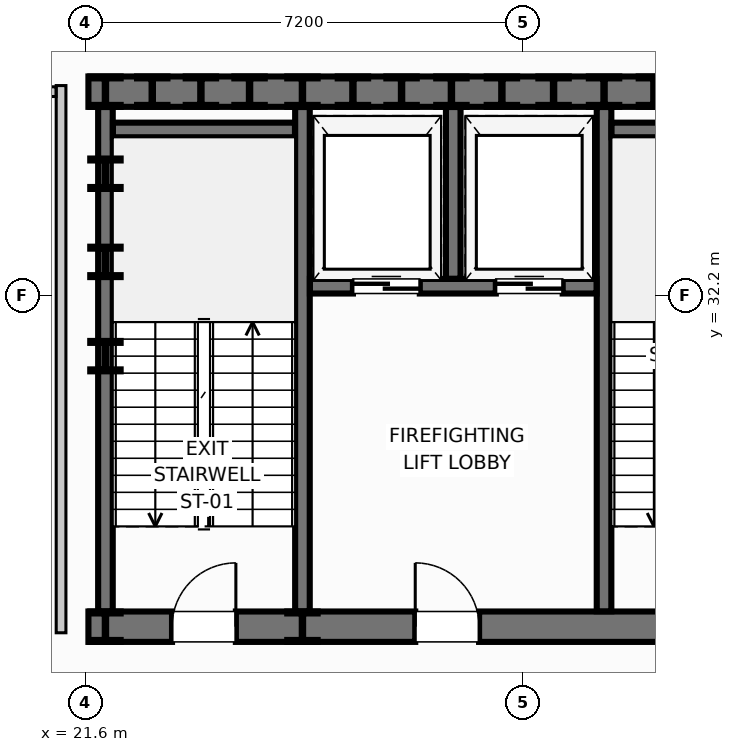
"""IFC4 building model, lengths in metres.
Left out: names, types, materials, properties, quantities, classifications, styles, units other than length and angle.
Written with IfcOpenShell. Run it as: python <this file> out.ifc"""

import sys

from ifc_helpers import new_model, si_unit, direction, frame, frame_2d, origin, origin_2d, place, context, subcontext, project, spatial, rectangle, i_section, extrude, element, fill, save


model = new_model("IFC4")
c1 = context("Model", 3, precision=1e-05, world=origin(), true_north=direction((0.0, 1.0)))
c2 = subcontext(c1, "Body", "Model", "MODEL_VIEW")
j1 = project(units=[si_unit("LENGTHUNIT", "METRE"), si_unit("PLANEANGLEUNIT", "RADIAN")], contexts=[c1])
p1 = place(None, origin())
s1 = spatial("IfcSite", under=j1, at=p1, CompositionType="ELEMENT")
p2 = place(p1, origin())
s2 = spatial("IfcBuilding", under=s1, at=p2, CompositionType="ELEMENT")
p3 = place(p2, frame((0.0, 0.0, 105.95)))
s3 = spatial("IfcBuildingStorey", under=s2, at=p3, CompositionType="ELEMENT", Elevation=105.95)
for number, where, z_axis, x_axis in (
    (1, (21.93, 35.55, 0.0), (0.0, 0.0, 1.0), (1.0, 0.0, 0.0)),
    (2, (23.5, 35.55, 0.0), (0.0, 0.0, 1.0), (1.0, 0.0, 0.0)),
    (3, (25.17, 35.55, 0.0), (0.0, 0.0, 1.0), (1.0, 0.0, 0.0)),
    (4, (26.8, 35.55, 0.0), (0.0, 0.0, 1.0), (1.0, 0.0, 0.0)),
    (5, (28.45, 35.55, 0.0), (0.0, 0.0, 1.0), (1.0, 0.0, 0.0)),
    (6, (30.13, 35.55, 0.0), (0.0, 0.0, 1.0), (1.0, 0.0, 0.0)),
    (7, (21.93, 26.75, 0.0), (0.0, 0.0, 1.0), (1.0, 0.0, 0.0)),
    (8, (25.17, 26.75, 0.0), (0.0, 0.0, 1.0), (1.0, 0.0, 0.0)),
    (9, (21.93, 31.2, 0.0), (0.0, 0.0, 1.0), (1.0, 0.0, 0.0)),
    (10, (21.93, 32.75, 0.0), (0.0, 0.0, 1.0), (1.0, 0.0, 0.0)),
    (11, (21.93, 34.2, 0.0), (0.0, 0.0, 1.0), (1.0, 0.0, 0.0)),
    (12, (22.7, 35.55, 0.0), (0.0, 0.0, 1.0), (1.0, 0.0, 0.0)),
    (13, (27.62, 35.55, 0.0), (0.0, 0.0, 1.0), (1.0, 0.0, 0.0)),
    (14, (24.3, 35.55, 0.0), (0.0, 0.0, 1.0), (1.0, 0.0, 0.0)),
    (15, (26.0, 35.55, 0.0), (0.0, 0.0, 1.0), (1.0, 0.0, 0.0)),
    (16, (29.3, 35.55, 0.0), (0.0, 0.0, 1.0), (1.0, 0.0, 0.0)),
    (17, (30.95, 35.55, 0.0), (0.0, 0.0, 1.0), (1.0, 0.0, 0.0)),
):
    element("IfcColumn", number, at=place(p3, frame(where, z_axis=z_axis, x_axis=x_axis)), inside=s3, PredefinedType="COLUMN", context=c2, shape_type="SweptSolid", body=[
        extrude(i_section(OverallWidth=0.5, OverallDepth=0.5, WebThickness=0.022, FlangeThickness=0.032, at=origin_2d()), origin(), (0.0, 0.0, 1.0), 4.5),
    ])
p4 = place(p3, frame((21.65, 26.75, 0.0), z_axis=(0.0, 0.0, 1.0), x_axis=(1.0, 0.0, 0.0)))
e18 = element("IfcWall", 18, at=p4, inside=s3, PredefinedType="SHEAR", context=c2, shape_type="SweptSolid", body=[
    extrude(rectangle(XDim=28.7, YDim=0.5, at=frame_2d((14.35, 0.0))), origin(), (0.0, 0.0, 1.0), 4.5),
])
p5 = place(p4, frame((1.375, 0.0, 0.0)))
e19 = element("IfcOpeningElement", 19, at=p5, cuts=e18, PredefinedType="OPENING", context=c2, shape_type="SweptSolid", body=[
    extrude(rectangle(XDim=1.05, YDim=2.0, at=frame_2d((0.525, 1.0))), frame((0.0, 0.26, 0.0), z_axis=(0.0, -1.0, 0.0), x_axis=(1.0, 0.0, 0.0)), (0.0, 0.0, 1.0), 0.52),
])
p6 = place(p4, frame((5.375, 0.0, 0.0)))
e20 = element("IfcOpeningElement", 20, at=p6, cuts=e18, PredefinedType="OPENING", context=c2, shape_type="SweptSolid", body=[
    extrude(rectangle(XDim=1.05, YDim=2.0, at=frame_2d((0.525, 1.0))), frame((0.0, 0.26, 0.0), z_axis=(0.0, -1.0, 0.0), x_axis=(1.0, 0.0, 0.0)), (0.0, 0.0, 1.0), 0.52),
])
p7 = place(p4, frame((9.575, 0.0, 0.0)))
e21 = element("IfcOpeningElement", 21, at=p7, cuts=e18, PredefinedType="OPENING", context=c2, shape_type="SweptSolid", body=[
    extrude(rectangle(XDim=1.05, YDim=2.0, at=frame_2d((0.525, 1.0))), frame((0.0, 0.26, 0.0), z_axis=(0.0, -1.0, 0.0), x_axis=(1.0, 0.0, 0.0)), (0.0, 0.0, 1.0), 0.52),
])
p8 = place(p4, frame((19.705, 0.0, 0.0)))
e22 = element("IfcOpeningElement", 22, at=p8, cuts=e18, PredefinedType="OPENING", context=c2, shape_type="SweptSolid", body=[
    extrude(rectangle(XDim=1.45, YDim=2.0, at=frame_2d((0.725, 1.0))), frame((0.0, 0.26, 0.0), z_axis=(0.0, -1.0, 0.0), x_axis=(1.0, 0.0, 0.0)), (0.0, 0.0, 1.0), 0.52),
])
p9 = place(p4, frame((26.275, 0.0, 0.0)))
e23 = element("IfcOpeningElement", 23, at=p9, cuts=e18, PredefinedType="OPENING", context=c2, shape_type="SweptSolid", body=[
    extrude(rectangle(XDim=1.05, YDim=2.0, at=frame_2d((0.525, 1.0))), frame((0.0, 0.26, 0.0), z_axis=(0.0, -1.0, 0.0), x_axis=(1.0, 0.0, 0.0)), (0.0, 0.0, 1.0), 0.52),
])
p10 = place(p3, frame((50.35, 35.55, 0.0), z_axis=(0.0, 0.0, 1.0), x_axis=(-1.0, 0.0, 0.0)))
e24 = element("IfcWall", 24, at=p10, inside=s3, PredefinedType="SHEAR", context=c2, shape_type="SweptSolid", body=[
    extrude(rectangle(XDim=28.7, YDim=0.5, at=frame_2d((14.35, 0.0))), origin(), (0.0, 0.0, 1.0), 4.5),
])
for number, where, z_axis, x_axis in (
    (25, (21.93, 35.297, 0.0), (0.0, 0.0, 1.0), (0.0, -1.0, 0.0)),
    (26, (25.17, 27.003, 0.0), (0.0, 0.0, 1.0), (0.0, 1.0, 0.0)),
):
    element("IfcWall", number, at=place(p3, frame(where, z_axis=z_axis, x_axis=x_axis)), inside=s3, PredefinedType="SHEAR", context=c2, shape_type="SweptSolid", body=[
        extrude(rectangle(XDim=8.294, YDim=0.24, at=frame_2d((4.147, 0.0))), origin(), (0.0, 0.0, 1.0), 4.5),
    ])
p11 = place(p3, frame((22.053, 34.92, 0.0), z_axis=(0.0, 0.0, 1.0), x_axis=(1.0, 0.0, 0.0)))
e27 = element("IfcWall", 27, at=p11, inside=s3, PredefinedType="SHEAR", context=c2, shape_type="SweptSolid", body=[
    extrude(rectangle(XDim=2.994, YDim=0.24, at=frame_2d((1.497, 0.0))), origin(), (0.0, 0.0, 1.0), 4.5),
])
p12 = place(p3, frame((30.13, 27.003, 0.0), z_axis=(0.0, 0.0, 1.0), x_axis=(0.0, 1.0, 0.0)))
e28 = element("IfcWall", 28, at=p12, inside=s3, PredefinedType="SHEAR", context=c2, shape_type="SweptSolid", body=[
    extrude(rectangle(XDim=8.294, YDim=0.24, at=frame_2d((4.147, 0.0))), origin(), (0.0, 0.0, 1.0), 4.5),
])
p13 = place(p3, frame((30.253, 34.92, 0.0), z_axis=(0.0, 0.0, 1.0), x_axis=(1.0, 0.0, 0.0)))
e29 = element("IfcWall", 29, at=p13, inside=s3, PredefinedType="SHEAR", context=c2, shape_type="SweptSolid", body=[
    extrude(rectangle(XDim=2.994, YDim=0.24, at=frame_2d((1.497, 0.0))), origin(), (0.0, 0.0, 1.0), 4.5),
])
p14 = place(p3, frame((25.293, 32.35, 0.0), z_axis=(0.0, 0.0, 1.0), x_axis=(1.0, 0.0, 0.0)))
e30 = element("IfcWall", 30, at=p14, inside=s3, PredefinedType="SHEAR", context=c2, shape_type="SweptSolid", body=[
    extrude(rectangle(XDim=4.714, YDim=0.24, at=frame_2d((2.357, 0.0))), origin(), (0.0, 0.0, 1.0), 4.5),
])
p15 = place(p14, frame((0.707, 0.0, 0.0)))
e31 = element("IfcOpeningElement", 31, at=p15, cuts=e30, PredefinedType="OPENING", context=c2, shape_type="SweptSolid", body=[
    extrude(rectangle(XDim=1.1, YDim=2.0, at=frame_2d((0.55, 1.0))), frame((0.0, 0.13, 0.0), z_axis=(0.0, -1.0, 0.0), x_axis=(1.0, 0.0, 0.0)), (0.0, 0.0, 1.0), 0.26),
])
p16 = place(p14, frame((3.057, 0.0, 0.0)))
e32 = element("IfcOpeningElement", 32, at=p16, cuts=e30, PredefinedType="OPENING", context=c2, shape_type="SweptSolid", body=[
    extrude(rectangle(XDim=1.1, YDim=2.0, at=frame_2d((0.55, 1.0))), frame((0.0, 0.13, 0.0), z_axis=(0.0, -1.0, 0.0), x_axis=(1.0, 0.0, 0.0)), (0.0, 0.0, 1.0), 0.26),
])
p17 = place(p3, frame((27.65, 32.473, 0.0), z_axis=(0.0, 0.0, 1.0), x_axis=(0.0, 1.0, 0.0)))
e33 = element("IfcWall", 33, at=p17, inside=s3, PredefinedType="SHEAR", context=c2, shape_type="SweptSolid", body=[
    extrude(rectangle(XDim=2.824, YDim=0.24, at=frame_2d((1.412, 0.0))), origin(), (0.0, 0.0, 1.0), 4.5),
])
p18 = place(p3, frame((21.2, 26.65, 0.0), z_axis=(0.0, 0.0, 1.0), x_axis=(0.0, 1.0, 0.0)))
e34 = element("IfcWall", 34, at=p18, inside=s3, PredefinedType="PARTITIONING", context=c2, shape_type="SweptSolid", body=[
    extrude(rectangle(XDim=9.0, YDim=0.16, at=frame_2d((4.5, 0.0))), origin(), (0.0, 0.0, 1.0), 4.245),
])
p19 = place(p3, frame((18.883, 35.55, 0.0), z_axis=(0.0, 0.0, 1.0), x_axis=(1.0, 0.0, 0.0)))
e35 = element("IfcWall", 35, at=p19, inside=s3, PredefinedType="PARTITIONING", context=c2, shape_type="SweptSolid", body=[
    extrude(rectangle(XDim=2.234, YDim=0.16, at=frame_2d((1.117, 0.0))), origin(), (0.0, 0.0, 1.0), 4.245),
])
p20 = place(p5, origin())
e36 = element("IfcDoor", 36, at=p20, inside=s3, OperationType="SINGLE_SWING_RIGHT", PredefinedType="DOOR", context=c2, shape_type="SweptSolid", body=[
    extrude(rectangle(XDim=1.05, YDim=2.0, at=frame_2d((0.525, 1.0))), frame((0.0, 0.025, 0.0), z_axis=(0.0, -1.0, 0.0), x_axis=(1.0, 0.0, 0.0)), (0.0, 0.0, 1.0), 0.05),
])
fill(e19, e36)
p21 = place(p6, origin())
e37 = element("IfcDoor", 37, at=p21, inside=s3, OperationType="SINGLE_SWING_LEFT", PredefinedType="DOOR", context=c2, shape_type="SweptSolid", body=[
    extrude(rectangle(XDim=1.05, YDim=2.0, at=frame_2d((0.525, 1.0))), frame((0.0, 0.025, 0.0), z_axis=(0.0, -1.0, 0.0), x_axis=(1.0, 0.0, 0.0)), (0.0, 0.0, 1.0), 0.05),
])
fill(e20, e37)
p22 = place(p15, origin())
e38 = element("IfcDoor", 38, at=p22, inside=s3, OperationType="DOUBLE_DOOR_SLIDING", PredefinedType="USERDEFINED", context=c2, shape_type="SweptSolid", body=[
    extrude(rectangle(XDim=1.1, YDim=2.0, at=frame_2d((0.55, 1.0))), frame((0.0, 0.025, 0.0), z_axis=(0.0, -1.0, 0.0), x_axis=(1.0, 0.0, 0.0)), (0.0, 0.0, 1.0), 0.05),
])
fill(e31, e38)
p23 = place(p16, origin())
e39 = element("IfcDoor", 39, at=p23, inside=s3, OperationType="DOUBLE_DOOR_SLIDING", PredefinedType="USERDEFINED", context=c2, shape_type="SweptSolid", body=[
    extrude(rectangle(XDim=1.1, YDim=2.0, at=frame_2d((0.55, 1.0))), frame((0.0, 0.025, 0.0), z_axis=(0.0, -1.0, 0.0), x_axis=(1.0, 0.0, 0.0)), (0.0, 0.0, 1.0), 0.05),
])
fill(e32, e39)
save(model, sys.argv[1])
